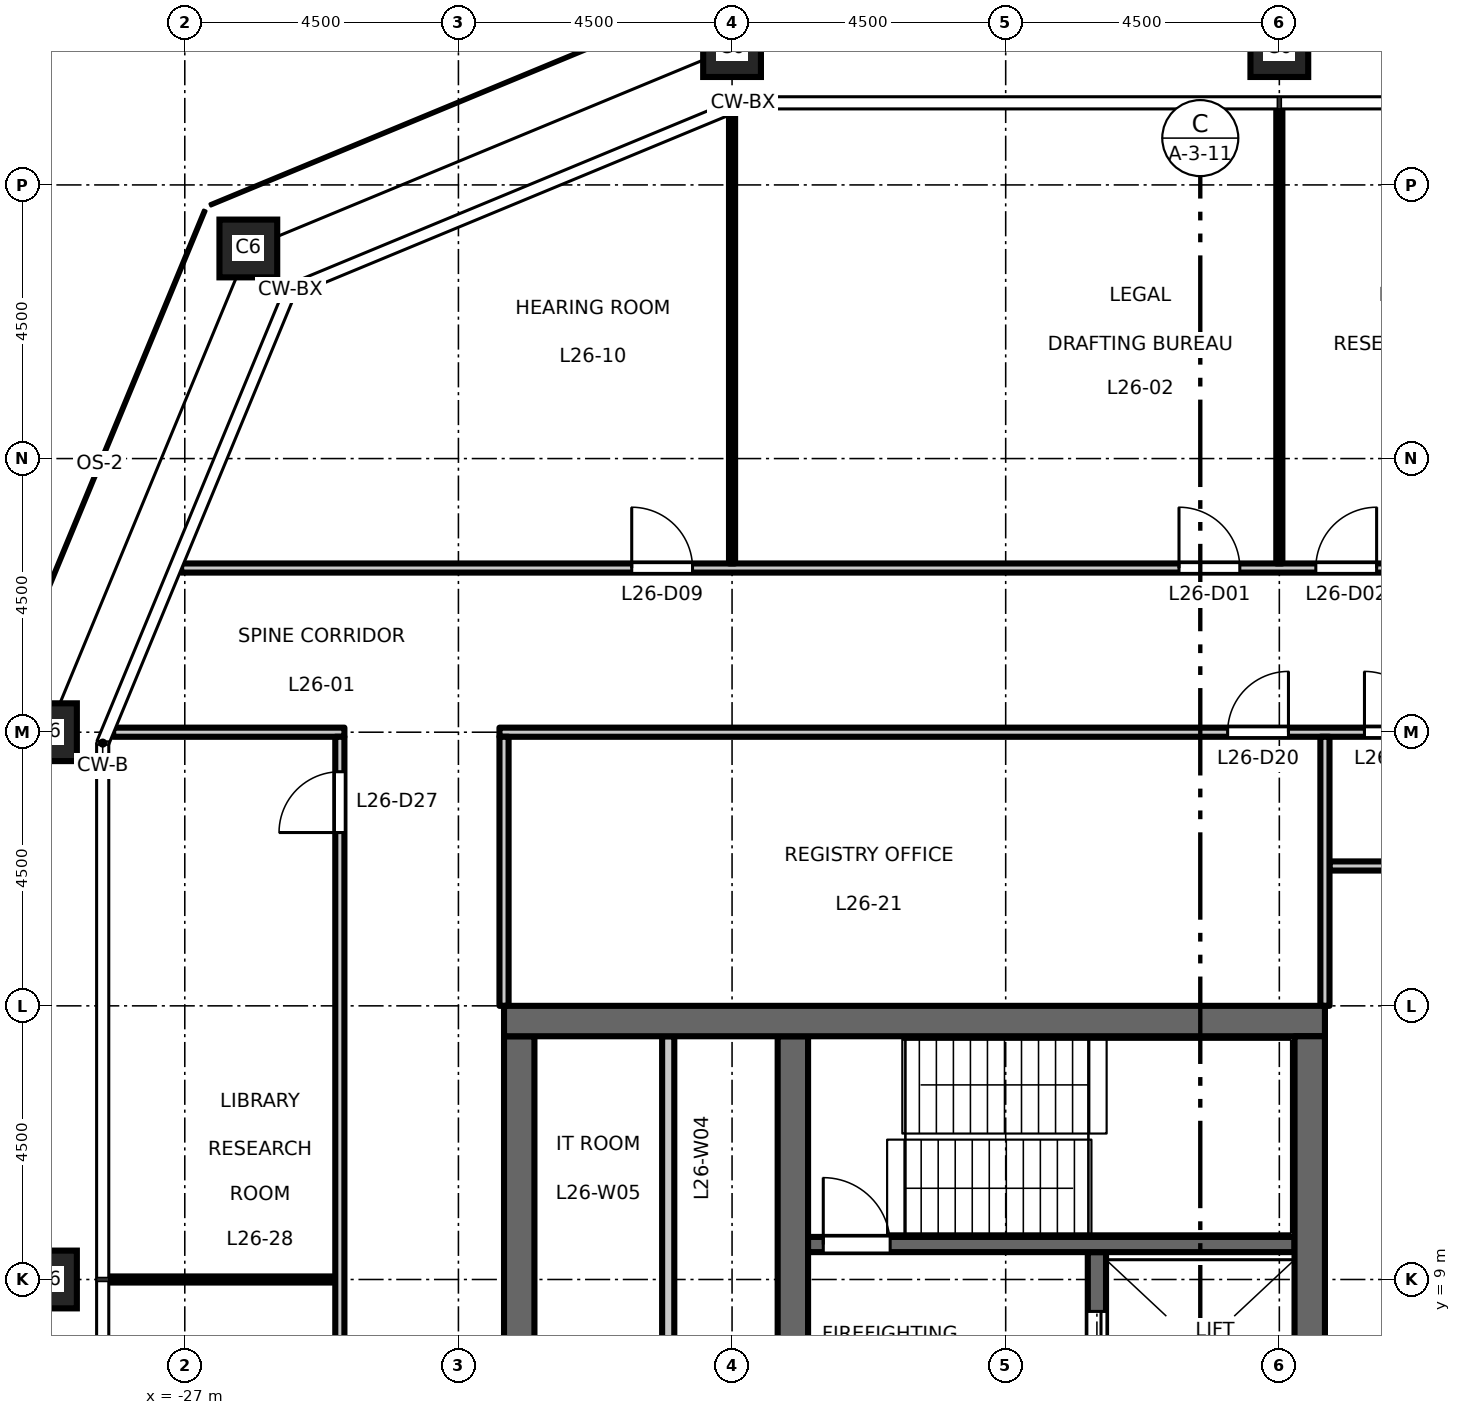
"""IFC4 building model, lengths in metres.
Left out: names, types, materials, properties, quantities, classifications, styles, units other than length and angle.
Written with IfcOpenShell. Run it as: python <this file> out.ifc"""

import sys

from ifc_helpers import new_model, si_unit, direction, frame, frame_2d, origin, origin_2d, place, context, subcontext, project, spatial, rectangle, hollow_rectangle, extrude, element, fill, save


model = new_model("IFC4")
c1 = context("Model", 3, precision=1e-05, world=origin(), true_north=direction((0.0, 1.0)))
c2 = subcontext(c1, "Body", "Model", "MODEL_VIEW")
j1 = project(units=[si_unit("LENGTHUNIT", "METRE"), si_unit("PLANEANGLEUNIT", "RADIAN")], contexts=[c1])
p1 = place(None, origin())
s1 = spatial("IfcSite", under=j1, at=p1, CompositionType="ELEMENT")
p2 = place(p1, origin())
s2 = spatial("IfcBuilding", under=s1, at=p2, CompositionType="ELEMENT")
p3 = place(p2, frame((0.0, 0.0, 122.7)))
s3 = spatial("IfcBuildingStorey", under=s2, at=p3, CompositionType="ELEMENT", Elevation=122.7)
for number, where, z_axis, x_axis in (
    (1, (-9.0, 29.25, 0.0), (0.0, 0.0, 1.0), (1.0, 0.0, 0.0)),
    (2, (-18.0, 29.25, 0.0), (0.0, 0.0, 1.0), (1.0, 0.0, 0.0)),
    (3, (-25.955, 25.955, 0.0), (0.0, 0.0, 1.0), (1.0, 0.0, 0.0)),
    (4, (-29.25, 18.0, 0.0), (0.0, 0.0, 1.0), (1.0, 0.0, 0.0)),
    (5, (-29.25, 9.0, 0.0), (0.0, 0.0, 1.0), (1.0, 0.0, 0.0)),
):
    element("IfcColumn", number, at=place(p3, frame(where, z_axis=z_axis, x_axis=x_axis)), inside=s3, PredefinedType="COLUMN", context=c2, shape_type="SweptSolid", body=[
        extrude(hollow_rectangle(XDim=0.95, YDim=0.95, WallThickness=0.055, at=origin_2d()), origin(), (0.0, 0.0, 1.0), 4.5),
    ])
p4 = place(p3, frame((-12.0, -9.45, 0.0), z_axis=(0.0, 0.0, 1.0), x_axis=(0.0, 1.0, 0.0)))
e6 = element("IfcWall", 6, at=p4, inside=s3, PredefinedType="SHEAR", context=c2, shape_type="SweptSolid", body=[
    extrude(rectangle(XDim=18.9, YDim=0.3, at=frame_2d((9.45, 0.0))), origin(), (0.0, 0.0, 1.0), 4.35),
])
p5 = place(p4, frame((3.625, 0.0, 0.0)))
e7 = element("IfcOpeningElement", 7, at=p5, cuts=e6, PredefinedType="OPENING", context=c2, shape_type="SweptSolid", body=[
    extrude(rectangle(XDim=1.1, YDim=2.1, at=frame_2d((0.55, 1.05))), frame((0.0, 0.16, 0.0), z_axis=(0.0, -1.0, 0.0), x_axis=(1.0, 0.0, 0.0)), (0.0, 0.0, 1.0), 0.32),
])
p6 = place(p4, frame((6.775, 0.0, 0.0)))
e8 = element("IfcOpeningElement", 8, at=p6, cuts=e6, PredefinedType="OPENING", context=c2, shape_type="SweptSolid", body=[
    extrude(rectangle(XDim=1.1, YDim=2.1, at=frame_2d((0.55, 1.05))), frame((0.0, 0.16, 0.0), z_axis=(0.0, -1.0, 0.0), x_axis=(1.0, 0.0, 0.0)), (0.0, 0.0, 1.0), 0.32),
])
p7 = place(p4, frame((9.925, 0.0, 0.0)))
e9 = element("IfcOpeningElement", 9, at=p7, cuts=e6, PredefinedType="OPENING", context=c2, shape_type="SweptSolid", body=[
    extrude(rectangle(XDim=1.1, YDim=2.1, at=frame_2d((0.55, 1.05))), frame((0.0, 0.16, 0.0), z_axis=(0.0, -1.0, 0.0), x_axis=(1.0, 0.0, 0.0)), (0.0, 0.0, 1.0), 0.32),
])
p8 = place(p4, frame((13.075, 0.0, 0.0)))
e10 = element("IfcOpeningElement", 10, at=p8, cuts=e6, PredefinedType="OPENING", context=c2, shape_type="SweptSolid", body=[
    extrude(rectangle(XDim=1.1, YDim=2.1, at=frame_2d((0.55, 1.05))), frame((0.0, 0.16, 0.0), z_axis=(0.0, -1.0, 0.0), x_axis=(1.0, 0.0, 0.0)), (0.0, 0.0, 1.0), 0.32),
])
p9 = place(p4, frame((16.725, 0.0, 0.0)))
e11 = element("IfcOpeningElement", 11, at=p9, cuts=e6, PredefinedType="OPENING", context=c2, shape_type="SweptSolid", body=[
    extrude(rectangle(XDim=1.2, YDim=2.1, at=frame_2d((0.6, 1.05))), frame((0.0, 0.16, 0.0), z_axis=(0.0, -1.0, 0.0), x_axis=(1.0, 0.0, 0.0)), (0.0, 0.0, 1.0), 0.32),
])
p10 = place(p4, frame((0.975, 0.0, 0.0)))
e12 = element("IfcOpeningElement", 12, at=p10, cuts=e6, PredefinedType="OPENING", context=c2, shape_type="SweptSolid", body=[
    extrude(rectangle(XDim=1.2, YDim=2.1, at=frame_2d((0.6, 1.05))), frame((0.0, 0.16, 0.0), z_axis=(0.0, -1.0, 0.0), x_axis=(1.0, 0.0, 0.0)), (0.0, 0.0, 1.0), 0.32),
])
p11 = place(p3, frame((-21.5, -13.0, 0.0), z_axis=(0.0, 0.0, 1.0), x_axis=(0.0, 1.0, 0.0)))
e13 = element("IfcWall", 13, at=p11, inside=s3, PredefinedType="SHEAR", context=c2, shape_type="SweptSolid", body=[
    extrude(rectangle(XDim=26.0, YDim=0.5, at=frame_2d((13.0, 0.0))), origin(), (0.0, 0.0, 1.0), 4.35),
])
p12 = place(p11, frame((16.825, 0.0, 0.0)))
e14 = element("IfcOpeningElement", 14, at=p12, cuts=e13, PredefinedType="OPENING", context=c2, shape_type="SweptSolid", body=[
    extrude(rectangle(XDim=1.8, YDim=2.1, at=frame_2d((0.9, 1.05))), frame((0.0, 0.26, 0.0), z_axis=(0.0, -1.0, 0.0), x_axis=(1.0, 0.0, 0.0)), (0.0, 0.0, 1.0), 0.52),
])
p13 = place(p11, frame((7.375, 0.0, 0.0)))
e15 = element("IfcOpeningElement", 15, at=p13, cuts=e13, PredefinedType="OPENING", context=c2, shape_type="SweptSolid", body=[
    extrude(rectangle(XDim=1.8, YDim=2.1, at=frame_2d((0.9, 1.05))), frame((0.0, 0.26, 0.0), z_axis=(0.0, -1.0, 0.0), x_axis=(1.0, 0.0, 0.0)), (0.0, 0.0, 1.0), 0.52),
])
p14 = place(p3, frame((-19.05, 6.425, 0.0), z_axis=(0.0, 0.0, 1.0), x_axis=(0.0, 1.0, 0.0)))
e16 = element("IfcWall", 16, at=p14, inside=s3, PredefinedType="PARTITIONING", context=c2, shape_type="SweptSolid", body=[
    extrude(rectangle(XDim=6.575, YDim=0.2, at=frame_2d((3.288, 0.0))), origin(), (0.0, 0.0, 1.0), 4.35),
])
p15 = place(p3, frame((-17.0, 6.425, 0.0), z_axis=(0.0, 0.0, 1.0), x_axis=(0.0, 1.0, 0.0)))
e17 = element("IfcWall", 17, at=p15, inside=s3, PredefinedType="SHEAR", context=c2, shape_type="SweptSolid", body=[
    extrude(rectangle(XDim=6.575, YDim=0.5, at=frame_2d((3.288, 0.0))), origin(), (0.0, 0.0, 1.0), 4.35),
])
p16 = place(p3, frame((-8.75, 9.575, 0.0), z_axis=(0.0, 0.0, 1.0), x_axis=(-1.0, 0.0, 0.0)))
e18 = element("IfcWall", 18, at=p16, inside=s3, PredefinedType="SHEAR", context=c2, shape_type="SweptSolid", body=[
    extrude(rectangle(XDim=8.0, YDim=0.25, at=frame_2d((4.0, 0.0))), origin(), (0.0, 0.0, 1.0), 4.35),
])
p17 = place(p16, frame((6.65, 0.0, 0.0)))
e19 = element("IfcOpeningElement", 19, at=p17, cuts=e18, PredefinedType="OPENING", context=c2, shape_type="SweptSolid", body=[
    extrude(rectangle(XDim=1.1, YDim=2.1, at=frame_2d((0.55, 1.05))), frame((0.0, 0.135, 0.0), z_axis=(0.0, -1.0, 0.0), x_axis=(1.0, 0.0, 0.0)), (0.0, 0.0, 1.0), 0.27),
])
p18 = place(p3, frame((-8.25, 13.25, 0.0), z_axis=(0.0, 0.0, 1.0), x_axis=(-1.0, 0.0, 0.0)))
e20 = element("IfcWall", 20, at=p18, inside=s3, PredefinedType="SHEAR", context=c2, shape_type="SweptSolid", body=[
    extrude(rectangle(XDim=13.5, YDim=0.5, at=frame_2d((6.75, 0.0))), origin(), (0.0, 0.0, 1.0), 4.35),
])
p19 = place(p3, frame((-8.5, -13.0, 0.0), z_axis=(0.0, 0.0, 1.0), x_axis=(0.0, 1.0, 0.0)))
e21 = element("IfcWall", 21, at=p19, inside=s3, PredefinedType="SHEAR", context=c2, shape_type="SweptSolid", body=[
    extrude(rectangle(XDim=26.0, YDim=0.5, at=frame_2d((13.0, 0.0))), origin(), (0.0, 0.0, 1.0), 4.35),
])
p20 = place(p3, frame((-28.26, 9.0, 0.0), z_axis=(0.0, 0.0, 1.0), x_axis=(1.0, 0.0, 0.0)))
e22 = element("IfcWall", 22, at=p20, inside=s3, PredefinedType="PARTITIONING", context=c2, shape_type="SweptSolid", body=[
    extrude(rectangle(XDim=3.735, YDim=0.1, at=frame_2d((1.868, 0.0))), origin(), (0.0, 0.0, 1.0), 4.35),
])
p21 = place(p3, frame((-8.175, 15.8, 0.0), z_axis=(0.0, 0.0, 1.0), x_axis=(1.0, 0.0, 0.0)))
e23 = element("IfcWall", 23, at=p21, inside=s3, PredefinedType="PARTITIONING", context=c2, shape_type="SweptSolid", body=[
    extrude(rectangle(XDim=14.715, YDim=0.15, at=frame_2d((7.357, 0.0))), origin(), (0.0, 0.0, 1.0), 4.35),
])
p22 = place(p21, frame((4.325, 0.0, 0.0)))
e24 = element("IfcOpeningElement", 24, at=p22, cuts=e23, PredefinedType="OPENING", context=c2, shape_type="SweptSolid", body=[
    extrude(rectangle(XDim=1.0, YDim=2.1, at=frame_2d((0.5, 1.05))), frame((0.0, 0.085, 0.0), z_axis=(0.0, -1.0, 0.0), x_axis=(1.0, 0.0, 0.0)), (0.0, 0.0, 1.0), 0.17),
])
p23 = place(p21, frame((6.575, 0.0, 0.0)))
e25 = element("IfcOpeningElement", 25, at=p23, cuts=e23, PredefinedType="OPENING", context=c2, shape_type="SweptSolid", body=[
    extrude(rectangle(XDim=1.0, YDim=2.1, at=frame_2d((0.5, 1.05))), frame((0.0, 0.085, 0.0), z_axis=(0.0, -1.0, 0.0), x_axis=(1.0, 0.0, 0.0)), (0.0, 0.0, 1.0), 0.17),
])
p24 = place(p21, frame((13.075, 0.0, 0.0)))
e26 = element("IfcOpeningElement", 26, at=p24, cuts=e23, PredefinedType="OPENING", context=c2, shape_type="SweptSolid", body=[
    extrude(rectangle(XDim=1.0, YDim=2.1, at=frame_2d((0.5, 1.05))), frame((0.0, 0.085, 0.0), z_axis=(0.0, -1.0, 0.0), x_axis=(1.0, 0.0, 0.0)), (0.0, 0.0, 1.0), 0.17),
])
p25 = place(p3, frame((-28.178, 18.0, 0.0), z_axis=(0.0, 0.0, 1.0), x_axis=(1.0, 0.0, 0.0)))
e27 = element("IfcWall", 27, at=p25, inside=s3, PredefinedType="PARTITIONING", context=c2, shape_type="SweptSolid", body=[
    extrude(rectangle(XDim=3.803, YDim=0.15, at=frame_2d((1.901, 0.0))), origin(), (0.0, 0.0, 1.0), 4.35),
])
p26 = place(p3, frame((-21.825, 18.0, 0.0), z_axis=(0.0, 0.0, 1.0), x_axis=(1.0, 0.0, 0.0)))
e28 = element("IfcWall", 28, at=p26, inside=s3, PredefinedType="PARTITIONING", context=c2, shape_type="SweptSolid", body=[
    extrude(rectangle(XDim=43.65, YDim=0.15, at=frame_2d((21.825, 0.0))), origin(), (0.0, 0.0, 1.0), 4.35),
])
p27 = place(p26, frame((14.225, 0.0, 0.0)))
e29 = element("IfcOpeningElement", 29, at=p27, cuts=e28, PredefinedType="OPENING", context=c2, shape_type="SweptSolid", body=[
    extrude(rectangle(XDim=1.0, YDim=2.1, at=frame_2d((0.5, 1.05))), frame((0.0, 0.085, 0.0), z_axis=(0.0, -1.0, 0.0), x_axis=(1.0, 0.0, 0.0)), (0.0, 0.0, 1.0), 0.17),
])
p28 = place(p26, frame((11.975, 0.0, 0.0)))
e30 = element("IfcOpeningElement", 30, at=p28, cuts=e28, PredefinedType="OPENING", context=c2, shape_type="SweptSolid", body=[
    extrude(rectangle(XDim=1.0, YDim=2.1, at=frame_2d((0.5, 1.05))), frame((0.0, 0.085, 0.0), z_axis=(0.0, -1.0, 0.0), x_axis=(1.0, 0.0, 0.0)), (0.0, 0.0, 1.0), 0.17),
])
p29 = place(p26, frame((30.725, 0.0, 0.0)))
e31 = element("IfcOpeningElement", 31, at=p29, cuts=e28, PredefinedType="OPENING", context=c2, shape_type="SweptSolid", body=[
    extrude(rectangle(XDim=1.0, YDim=2.1, at=frame_2d((0.5, 1.05))), frame((0.0, 0.085, 0.0), z_axis=(0.0, -1.0, 0.0), x_axis=(1.0, 0.0, 0.0)), (0.0, 0.0, 1.0), 0.17),
])
p30 = place(p3, frame((-27.06, 20.7, 0.0), z_axis=(0.0, 0.0, 1.0), x_axis=(1.0, 0.0, 0.0)))
e32 = element("IfcWall", 32, at=p30, inside=s3, PredefinedType="PARTITIONING", context=c2, shape_type="SweptSolid", body=[
    extrude(rectangle(XDim=54.12, YDim=0.15, at=frame_2d((27.06, 0.0))), origin(), (0.0, 0.0, 1.0), 4.35),
])
p31 = place(p30, frame((16.41, 0.0, 0.0)))
e33 = element("IfcOpeningElement", 33, at=p31, cuts=e32, PredefinedType="OPENING", context=c2, shape_type="SweptSolid", body=[
    extrude(rectangle(XDim=1.0, YDim=2.1, at=frame_2d((0.5, 1.05))), frame((0.0, 0.085, 0.0), z_axis=(0.0, -1.0, 0.0), x_axis=(1.0, 0.0, 0.0)), (0.0, 0.0, 1.0), 0.17),
])
p32 = place(p30, frame((18.66, 0.0, 0.0)))
e34 = element("IfcOpeningElement", 34, at=p32, cuts=e32, PredefinedType="OPENING", context=c2, shape_type="SweptSolid", body=[
    extrude(rectangle(XDim=1.0, YDim=2.1, at=frame_2d((0.5, 1.05))), frame((0.0, 0.085, 0.0), z_axis=(0.0, -1.0, 0.0), x_axis=(1.0, 0.0, 0.0)), (0.0, 0.0, 1.0), 0.17),
])
p33 = place(p30, frame((34.41, 0.0, 0.0)))
e35 = element("IfcOpeningElement", 35, at=p33, cuts=e32, PredefinedType="OPENING", context=c2, shape_type="SweptSolid", body=[
    extrude(rectangle(XDim=1.0, YDim=2.1, at=frame_2d((0.5, 1.05))), frame((0.0, 0.085, 0.0), z_axis=(0.0, -1.0, 0.0), x_axis=(1.0, 0.0, 0.0)), (0.0, 0.0, 1.0), 0.17),
])
p34 = place(p30, frame((36.66, 0.0, 0.0)))
e36 = element("IfcOpeningElement", 36, at=p34, cuts=e32, PredefinedType="OPENING", context=c2, shape_type="SweptSolid", body=[
    extrude(rectangle(XDim=1.0, YDim=2.1, at=frame_2d((0.5, 1.05))), frame((0.0, 0.085, 0.0), z_axis=(0.0, -1.0, 0.0), x_axis=(1.0, 0.0, 0.0)), (0.0, 0.0, 1.0), 0.17),
])
p35 = place(p30, frame((7.41, 0.0, 0.0)))
e37 = element("IfcOpeningElement", 37, at=p35, cuts=e32, PredefinedType="OPENING", context=c2, shape_type="SweptSolid", body=[
    extrude(rectangle(XDim=1.0, YDim=2.1, at=frame_2d((0.5, 1.05))), frame((0.0, 0.085, 0.0), z_axis=(0.0, -1.0, 0.0), x_axis=(1.0, 0.0, 0.0)), (0.0, 0.0, 1.0), 0.17),
])
p36 = place(p30, frame((45.72, 0.0, 0.0)))
e38 = element("IfcOpeningElement", 38, at=p36, cuts=e32, PredefinedType="OPENING", context=c2, shape_type="SweptSolid", body=[
    extrude(rectangle(XDim=1.0, YDim=2.1, at=frame_2d((0.5, 1.05))), frame((0.0, 0.085, 0.0), z_axis=(0.0, -1.0, 0.0), x_axis=(1.0, 0.0, 0.0)), (0.0, 0.0, 1.0), 0.17),
])
p37 = place(p3, frame((-24.45, -17.925, 0.0), z_axis=(0.0, 0.0, 1.0), x_axis=(0.0, 1.0, 0.0)))
e39 = element("IfcWall", 39, at=p37, inside=s3, PredefinedType="PARTITIONING", context=c2, shape_type="SweptSolid", body=[
    extrude(rectangle(XDim=35.85, YDim=0.15, at=frame_2d((17.925, 0.0))), origin(), (0.0, 0.0, 1.0), 4.35),
])
p38 = place(p37, frame((0.525, 0.0, 0.0)))
e40 = element("IfcOpeningElement", 40, at=p38, cuts=e39, PredefinedType="OPENING", context=c2, shape_type="SweptSolid", body=[
    extrude(rectangle(XDim=1.0, YDim=2.1, at=frame_2d((0.5, 1.05))), frame((0.0, 0.085, 0.0), z_axis=(0.0, -1.0, 0.0), x_axis=(1.0, 0.0, 0.0)), (0.0, 0.0, 1.0), 0.17),
])
p39 = place(p37, frame((16.275, 0.0, 0.0)))
e41 = element("IfcOpeningElement", 41, at=p39, cuts=e39, PredefinedType="OPENING", context=c2, shape_type="SweptSolid", body=[
    extrude(rectangle(XDim=1.0, YDim=2.1, at=frame_2d((0.5, 1.05))), frame((0.0, 0.085, 0.0), z_axis=(0.0, -1.0, 0.0), x_axis=(1.0, 0.0, 0.0)), (0.0, 0.0, 1.0), 0.17),
])
p40 = place(p37, frame((18.525, 0.0, 0.0)))
e42 = element("IfcOpeningElement", 42, at=p40, cuts=e39, PredefinedType="OPENING", context=c2, shape_type="SweptSolid", body=[
    extrude(rectangle(XDim=1.0, YDim=2.1, at=frame_2d((0.5, 1.05))), frame((0.0, 0.085, 0.0), z_axis=(0.0, -1.0, 0.0), x_axis=(1.0, 0.0, 0.0)), (0.0, 0.0, 1.0), 0.17),
])
p41 = place(p37, frame((34.275, 0.0, 0.0)))
e43 = element("IfcOpeningElement", 43, at=p41, cuts=e39, PredefinedType="OPENING", context=c2, shape_type="SweptSolid", body=[
    extrude(rectangle(XDim=1.0, YDim=2.1, at=frame_2d((0.5, 1.05))), frame((0.0, 0.085, 0.0), z_axis=(0.0, -1.0, 0.0), x_axis=(1.0, 0.0, 0.0)), (0.0, 0.0, 1.0), 0.17),
])
p42 = place(p3, frame((-21.75, 13.5, 0.0), z_axis=(0.0, 0.0, 1.0), x_axis=(0.0, 1.0, 0.0)))
e44 = element("IfcWall", 44, at=p42, inside=s3, PredefinedType="PARTITIONING", context=c2, shape_type="SweptSolid", body=[
    extrude(rectangle(XDim=4.425, YDim=0.15, at=frame_2d((2.212, 0.0))), origin(), (0.0, 0.0, 1.0), 4.35),
])
p43 = place(p3, frame((-18.0, 20.775, 0.0), z_axis=(0.0, 0.0, 1.0), x_axis=(0.0, 1.0, 0.0)))
e45 = element("IfcWall", 45, at=p43, inside=s3, PredefinedType="PARTITIONING", context=c2, shape_type="SweptSolid", body=[
    extrude(rectangle(XDim=7.403, YDim=0.1, at=frame_2d((3.702, 0.0))), origin(), (0.0, 0.0, 1.0), 3.45),
])
p44 = place(p3, frame((-9.0, 20.775, 0.0), z_axis=(0.0, 0.0, 1.0), x_axis=(0.0, 1.0, 0.0)))
e46 = element("IfcWall", 46, at=p44, inside=s3, PredefinedType="PARTITIONING", context=c2, shape_type="SweptSolid", body=[
    extrude(rectangle(XDim=7.485, YDim=0.1, at=frame_2d((3.743, 0.0))), origin(), (0.0, 0.0, 1.0), 3.45),
])
p45 = place(p3, frame((-8.25, 13.5, 0.0), z_axis=(0.0, 0.0, 1.0), x_axis=(0.0, 1.0, 0.0)))
e47 = element("IfcWall", 47, at=p45, inside=s3, PredefinedType="PARTITIONING", context=c2, shape_type="SweptSolid", body=[
    extrude(rectangle(XDim=4.425, YDim=0.15, at=frame_2d((2.212, 0.0))), origin(), (0.0, 0.0, 1.0), 4.35),
])
p46 = place(p17, origin())
e48 = element("IfcDoor", 48, at=p46, inside=s3, OperationType="SINGLE_SWING_RIGHT", PredefinedType="DOOR", context=c2, shape_type="SweptSolid", body=[
    extrude(rectangle(XDim=1.1, YDim=2.1, at=frame_2d((0.55, 1.05))), frame((0.0, 0.025, 0.0), z_axis=(0.0, -1.0, 0.0), x_axis=(1.0, 0.0, 0.0)), (0.0, 0.0, 1.0), 0.05),
])
fill(e19, e48)
p47 = place(p9, origin())
e49 = element("IfcDoor", 49, at=p47, inside=s3, OperationType="DOUBLE_DOOR_SLIDING", PredefinedType="DOOR", context=c2, shape_type="SweptSolid", body=[
    extrude(rectangle(XDim=1.2, YDim=2.1, at=frame_2d((0.6, 1.05))), frame((0.0, 0.025, 0.0), z_axis=(0.0, -1.0, 0.0), x_axis=(1.0, 0.0, 0.0)), (0.0, 0.0, 1.0), 0.05),
])
fill(e11, e49)
p48 = place(p31, origin())
e50 = element("IfcDoor", 50, at=p48, inside=s3, OperationType="SINGLE_SWING_LEFT", PredefinedType="DOOR", context=c2, shape_type="SweptSolid", body=[
    extrude(rectangle(XDim=1.0, YDim=2.1, at=frame_2d((0.5, 1.05))), frame((0.0, 0.025, 0.0), z_axis=(0.0, -1.0, 0.0), x_axis=(1.0, 0.0, 0.0)), (0.0, 0.0, 1.0), 0.05),
])
fill(e33, e50)
p49 = place(p32, origin())
e51 = element("IfcDoor", 51, at=p49, inside=s3, OperationType="SINGLE_SWING_RIGHT", PredefinedType="DOOR", context=c2, shape_type="SweptSolid", body=[
    extrude(rectangle(XDim=1.0, YDim=2.1, at=frame_2d((0.5, 1.05))), frame((0.0, 0.025, 0.0), z_axis=(0.0, -1.0, 0.0), x_axis=(1.0, 0.0, 0.0)), (0.0, 0.0, 1.0), 0.05),
])
fill(e34, e51)
p50 = place(p35, origin())
e52 = element("IfcDoor", 52, at=p50, inside=s3, OperationType="SINGLE_SWING_LEFT", PredefinedType="DOOR", context=c2, shape_type="SweptSolid", body=[
    extrude(rectangle(XDim=1.0, YDim=2.1, at=frame_2d((0.5, 1.05))), frame((0.0, 0.025, 0.0), z_axis=(0.0, -1.0, 0.0), x_axis=(1.0, 0.0, 0.0)), (0.0, 0.0, 1.0), 0.05),
])
fill(e37, e52)
p51 = place(p27, origin())
e53 = element("IfcDoor", 53, at=p51, inside=s3, OperationType="SINGLE_SWING_LEFT", PredefinedType="DOOR", context=c2, shape_type="SweptSolid", body=[
    extrude(rectangle(XDim=1.0, YDim=2.1, at=frame_2d((0.5, 1.05))), frame((0.0, 0.025, 0.0), z_axis=(0.0, -1.0, 0.0), x_axis=(1.0, 0.0, 0.0)), (0.0, 0.0, 1.0), 0.05),
])
fill(e29, e53)
p52 = place(p28, origin())
e54 = element("IfcDoor", 54, at=p52, inside=s3, OperationType="SINGLE_SWING_RIGHT", PredefinedType="DOOR", context=c2, shape_type="SweptSolid", body=[
    extrude(rectangle(XDim=1.0, YDim=2.1, at=frame_2d((0.5, 1.05))), frame((0.0, 0.025, 0.0), z_axis=(0.0, -1.0, 0.0), x_axis=(1.0, 0.0, 0.0)), (0.0, 0.0, 1.0), 0.05),
])
fill(e30, e54)
p53 = place(p41, origin())
e55 = element("IfcDoor", 55, at=p53, inside=s3, OperationType="SINGLE_SWING_LEFT", PredefinedType="DOOR", context=c2, shape_type="SweptSolid", body=[
    extrude(rectangle(XDim=1.0, YDim=2.1, at=frame_2d((0.5, 1.05))), frame((0.0, 0.025, 0.0), z_axis=(0.0, -1.0, 0.0), x_axis=(1.0, 0.0, 0.0)), (0.0, 0.0, 1.0), 0.05),
])
fill(e43, e55)
save(model, sys.argv[1])
